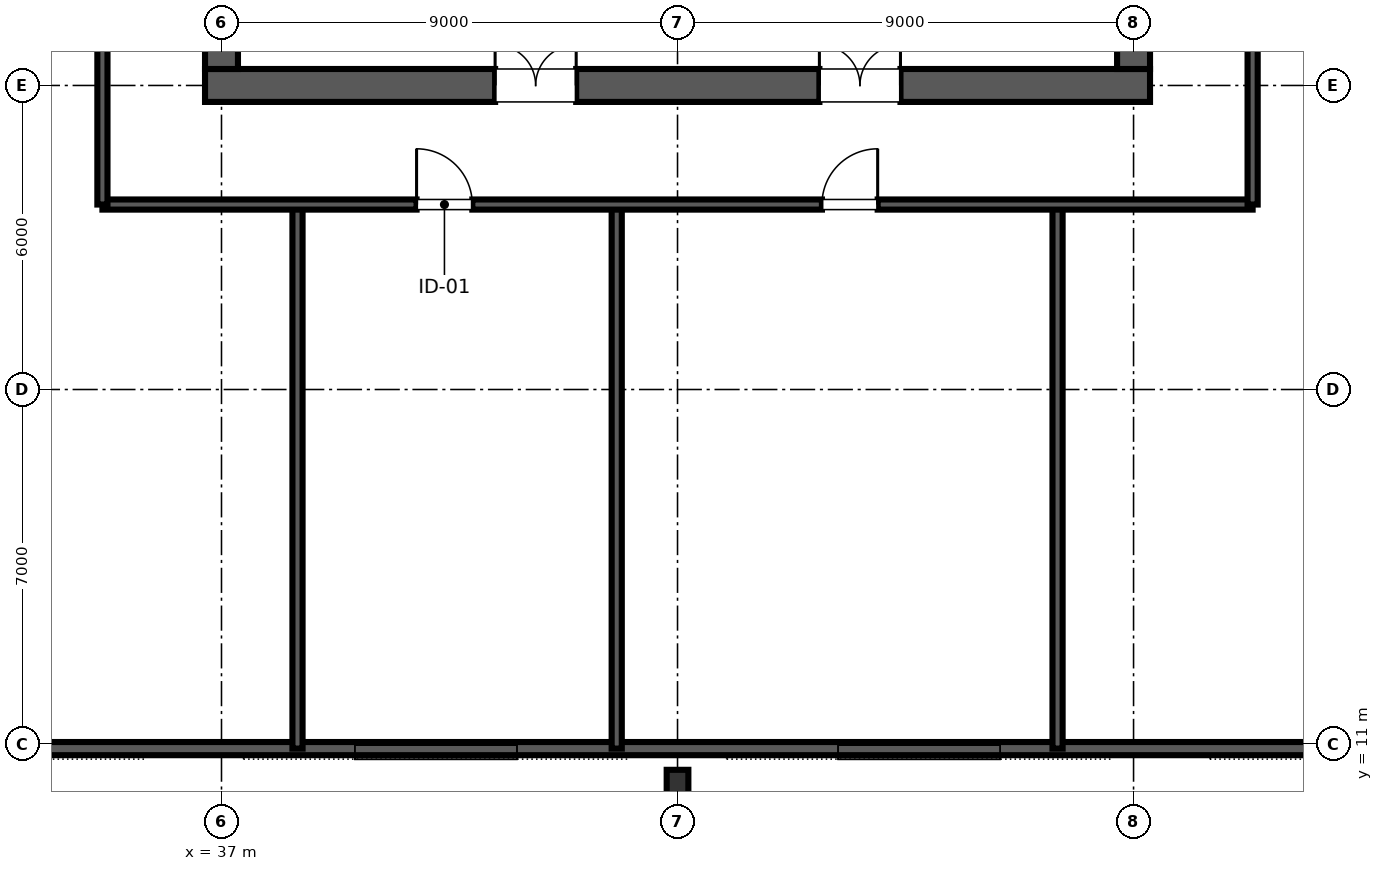
"""IFC4 building model, lengths in metres.
Left out: names, types, materials, properties, quantities, classifications, styles, units other than length and angle.
Written with IfcOpenShell. Run it as: python <this file> out.ifc"""

import sys

from ifc_helpers import new_model, si_unit, direction, frame, frame_2d, origin, origin_2d, place, context, subcontext, project, spatial, rectangle, i_section, extrude, element, fill, save


model = new_model("IFC4")
c1 = context("Model", 3, precision=1e-05, world=origin(), true_north=direction((0.0, 1.0)))
c2 = subcontext(c1, "Body", "Model", "MODEL_VIEW")
j1 = project(units=[si_unit("LENGTHUNIT", "METRE"), si_unit("PLANEANGLEUNIT", "RADIAN")], contexts=[c1])
p1 = place(None, origin())
s1 = spatial("IfcSite", under=j1, at=p1, CompositionType="ELEMENT")
p2 = place(p1, origin())
s2 = spatial("IfcBuilding", under=s1, at=p2, CompositionType="ELEMENT")
p3 = place(p2, frame((0.0, 0.0, 85.6)))
s3 = spatial("IfcBuildingStorey", under=s2, at=p3, CompositionType="ELEMENT", Elevation=85.6)
p4 = place(p3, frame((36.675, 24.0, 0.0), z_axis=(0.0, 0.0, 1.0), x_axis=(1.0, 0.0, 0.0)))
e1 = element("IfcWall", 1, at=p4, inside=s3, PredefinedType="SHEAR", context=c2, shape_type="SweptSolid", body=[
    extrude(rectangle(XDim=18.65, YDim=0.65, at=frame_2d((9.325, 0.0))), origin(), (0.0, 0.0, 1.0), 4.48),
])
p5 = place(p4, frame((5.725, 0.0, 0.0)))
e2 = element("IfcOpeningElement", 2, at=p5, cuts=e1, PredefinedType="OPENING", context=c2, shape_type="SweptSolid", body=[
    extrude(rectangle(XDim=1.6, YDim=2.15, at=frame_2d((0.8, 1.075))), frame((0.0, 0.335, 0.0), z_axis=(0.0, -1.0, 0.0), x_axis=(1.0, 0.0, 0.0)), (0.0, 0.0, 1.0), 0.67),
])
p6 = place(p4, frame((12.125, 0.0, 0.0)))
e3 = element("IfcOpeningElement", 3, at=p6, cuts=e1, PredefinedType="OPENING", context=c2, shape_type="SweptSolid", body=[
    extrude(rectangle(XDim=1.6, YDim=2.15, at=frame_2d((0.8, 1.075))), frame((0.0, 0.335, 0.0), z_axis=(0.0, -1.0, 0.0), x_axis=(1.0, 0.0, 0.0)), (0.0, 0.0, 1.0), 0.67),
])
p7 = place(p3, frame((37.0, 24.325, 0.0), z_axis=(0.0, 0.0, 1.0), x_axis=(0.0, 1.0, 0.0)))
e4 = element("IfcWall", 4, at=p7, inside=s3, PredefinedType="SHEAR", context=c2, shape_type="SweptSolid", body=[
    extrude(rectangle(XDim=15.35, YDim=0.65, at=frame_2d((7.675, 0.0))), origin(), (0.0, 0.0, 1.0), 4.48),
])
p8 = place(p7, frame((5.2, 0.0, 0.0)))
e5 = element("IfcOpeningElement", 5, at=p8, cuts=e4, PredefinedType="OPENING", context=c2, shape_type="SweptSolid", body=[
    extrude(rectangle(XDim=1.15, YDim=2.15, at=frame_2d((0.575, 1.075))), frame((0.0, 0.335, 0.0), z_axis=(0.0, -1.0, 0.0), x_axis=(1.0, 0.0, 0.0)), (0.0, 0.0, 1.0), 0.67),
])
p9 = place(p3, frame((55.0, 24.325, 0.0), z_axis=(0.0, 0.0, 1.0), x_axis=(0.0, 1.0, 0.0)))
e6 = element("IfcWall", 6, at=p9, inside=s3, PredefinedType="SHEAR", context=c2, shape_type="SweptSolid", body=[
    extrude(rectangle(XDim=15.35, YDim=0.65, at=frame_2d((7.675, 0.0))), origin(), (0.0, 0.0, 1.0), 4.48),
])
p10 = place(p9, frame((5.2, 0.0, 0.0)))
e7 = element("IfcOpeningElement", 7, at=p10, cuts=e6, PredefinedType="OPENING", context=c2, shape_type="SweptSolid", body=[
    extrude(rectangle(XDim=1.15, YDim=2.15, at=frame_2d((0.575, 1.075))), frame((0.0, 0.335, 0.0), z_axis=(0.0, -1.0, 0.0), x_axis=(1.0, 0.0, 0.0)), (0.0, 0.0, 1.0), 0.67),
])
p11 = place(p3, frame((46.0, 10.253, 0.0), z_axis=(0.0, 0.04091223057, 0.999162744196), x_axis=(-1.0, 0.0, 0.0)))
e8 = element("IfcColumn", 8, at=p11, inside=s3, PredefinedType="COLUMN", context=c2, shape_type="SweptSolid", body=[
    extrude(i_section(OverallWidth=0.428, OverallDepth=0.483, WebThickness=0.051, FlangeThickness=0.082, FilletRadius=0.025, at=origin_2d()), origin(), (0.0, 0.0, 1.0), 4.481),
])
p12 = place(p3, frame((26.027, 10.913, 0.0), z_axis=(0.0, 0.0, 1.0), x_axis=(1.0, 0.0, 0.0)))
e9 = element("IfcWall", 9, at=p12, inside=s3, PredefinedType="STANDARD", context=c2, shape_type="SweptSolid", body=[
    extrude(rectangle(XDim=39.947, YDim=0.26, at=frame_2d((19.973, 0.0))), origin(), (0.0, 0.0, 1.0), 4.48),
])
for number, where, z_axis, x_axis in (
    (10, (44.8, 10.913, 0.0), (0.0, 0.0, 1.0), (0.0, 1.0, 0.0)),
    (11, (38.5, 10.913, 0.0), (0.0, 0.0, 1.0), (0.0, 1.0, 0.0)),
    (12, (53.5, 10.913, 0.0), (0.0, 0.0, 1.0), (0.0, 1.0, 0.0)),
):
    element("IfcWall", number, at=place(p3, frame(where, z_axis=z_axis, x_axis=x_axis)), inside=s3, PredefinedType="PARTITIONING", context=c2, shape_type="SweptSolid", body=[
        extrude(rectangle(XDim=10.737, YDim=0.2, at=frame_2d((5.368, 0.0))), origin(), (0.0, 0.0, 1.0), 4.48),
    ])
p13 = place(p3, frame((34.65, 21.65, 0.0), z_axis=(0.0, 0.0, 1.0), x_axis=(1.0, 0.0, 0.0)))
e13 = element("IfcWall", 13, at=p13, inside=s3, PredefinedType="PARTITIONING", context=c2, shape_type="SweptSolid", body=[
    extrude(rectangle(XDim=22.7, YDim=0.2, at=frame_2d((11.35, 0.0))), origin(), (0.0, 0.0, 1.0), 3.41),
])
p14 = place(p13, frame((6.2, 0.0, 0.0)))
e14 = element("IfcOpeningElement", 14, at=p14, cuts=e13, PredefinedType="OPENING", context=c2, shape_type="SweptSolid", body=[
    extrude(rectangle(XDim=1.1, YDim=2.15, at=frame_2d((0.55, 1.075))), frame((0.0, 0.11, 0.0), z_axis=(0.0, -1.0, 0.0), x_axis=(1.0, 0.0, 0.0)), (0.0, 0.0, 1.0), 0.22),
])
p15 = place(p13, frame((14.2, 0.0, 0.0)))
e15 = element("IfcOpeningElement", 15, at=p15, cuts=e13, PredefinedType="OPENING", context=c2, shape_type="SweptSolid", body=[
    extrude(rectangle(XDim=1.1, YDim=2.15, at=frame_2d((0.55, 1.075))), frame((0.0, 0.11, 0.0), z_axis=(0.0, -1.0, 0.0), x_axis=(1.0, 0.0, 0.0)), (0.0, 0.0, 1.0), 0.22),
])
p16 = place(p3, frame((34.65, 21.65, 0.0), z_axis=(0.0, 0.0, 1.0), x_axis=(0.0, 1.0, 0.0)))
e16 = element("IfcWall", 16, at=p16, inside=s3, PredefinedType="PARTITIONING", context=c2, shape_type="SweptSolid", body=[
    extrude(rectangle(XDim=20.7, YDim=0.2, at=frame_2d((10.35, 0.0))), origin(), (0.0, 0.0, 1.0), 3.41),
])
p17 = place(p16, frame((9.6, 0.0, 0.0)))
e17 = element("IfcOpeningElement", 17, at=p17, cuts=e16, PredefinedType="OPENING", context=c2, shape_type="SweptSolid", body=[
    extrude(rectangle(XDim=1.6, YDim=2.15, at=frame_2d((0.8, 1.075))), frame((0.0, 0.11, 0.0), z_axis=(0.0, -1.0, 0.0), x_axis=(1.0, 0.0, 0.0)), (0.0, 0.0, 1.0), 0.22),
])
p18 = place(p3, frame((57.35, 21.65, 0.0), z_axis=(0.0, 0.0, 1.0), x_axis=(0.0, 1.0, 0.0)))
e18 = element("IfcWall", 18, at=p18, inside=s3, PredefinedType="PARTITIONING", context=c2, shape_type="SweptSolid", body=[
    extrude(rectangle(XDim=20.7, YDim=0.2, at=frame_2d((10.35, 0.0))), origin(), (0.0, 0.0, 1.0), 3.41),
])
p19 = place(p18, frame((9.6, 0.0, 0.0)))
e19 = element("IfcOpeningElement", 19, at=p19, cuts=e18, PredefinedType="OPENING", context=c2, shape_type="SweptSolid", body=[
    extrude(rectangle(XDim=1.6, YDim=2.15, at=frame_2d((0.8, 1.075))), frame((0.0, 0.11, 0.0), z_axis=(0.0, -1.0, 0.0), x_axis=(1.0, 0.0, 0.0)), (0.0, 0.0, 1.0), 0.22),
])
p20 = place(p5, origin())
e20 = element("IfcDoor", 20, at=p20, inside=s3, OperationType="DOUBLE_DOOR_SINGLE_SWING", PredefinedType="DOOR", context=c2, shape_type="SweptSolid", body=[
    extrude(rectangle(XDim=1.6, YDim=2.15, at=frame_2d((0.8, 1.075))), frame((0.0, 0.025, 0.0), z_axis=(0.0, -1.0, 0.0), x_axis=(1.0, 0.0, 0.0)), (0.0, 0.0, 1.0), 0.05),
])
fill(e2, e20)
p21 = place(p6, origin())
e21 = element("IfcDoor", 21, at=p21, inside=s3, OperationType="DOUBLE_DOOR_SINGLE_SWING", PredefinedType="DOOR", context=c2, shape_type="SweptSolid", body=[
    extrude(rectangle(XDim=1.6, YDim=2.15, at=frame_2d((0.8, 1.075))), frame((0.0, 0.025, 0.0), z_axis=(0.0, -1.0, 0.0), x_axis=(1.0, 0.0, 0.0)), (0.0, 0.0, 1.0), 0.05),
])
fill(e3, e21)
p22 = place(p14, origin())
e22 = element("IfcDoor", 22, at=p22, inside=s3, OperationType="SINGLE_SWING_LEFT", PredefinedType="DOOR", context=c2, shape_type="SweptSolid", body=[
    extrude(rectangle(XDim=1.1, YDim=2.15, at=frame_2d((0.55, 1.075))), frame((0.0, 0.025, 0.0), z_axis=(0.0, -1.0, 0.0), x_axis=(1.0, 0.0, 0.0)), (0.0, 0.0, 1.0), 0.05),
])
fill(e14, e22)
p23 = place(p15, origin())
e23 = element("IfcDoor", 23, at=p23, inside=s3, OperationType="SINGLE_SWING_RIGHT", PredefinedType="DOOR", context=c2, shape_type="SweptSolid", body=[
    extrude(rectangle(XDim=1.1, YDim=2.15, at=frame_2d((0.55, 1.075))), frame((0.0, 0.025, 0.0), z_axis=(0.0, -1.0, 0.0), x_axis=(1.0, 0.0, 0.0)), (0.0, 0.0, 1.0), 0.05),
])
fill(e15, e23)
save(model, sys.argv[1])
